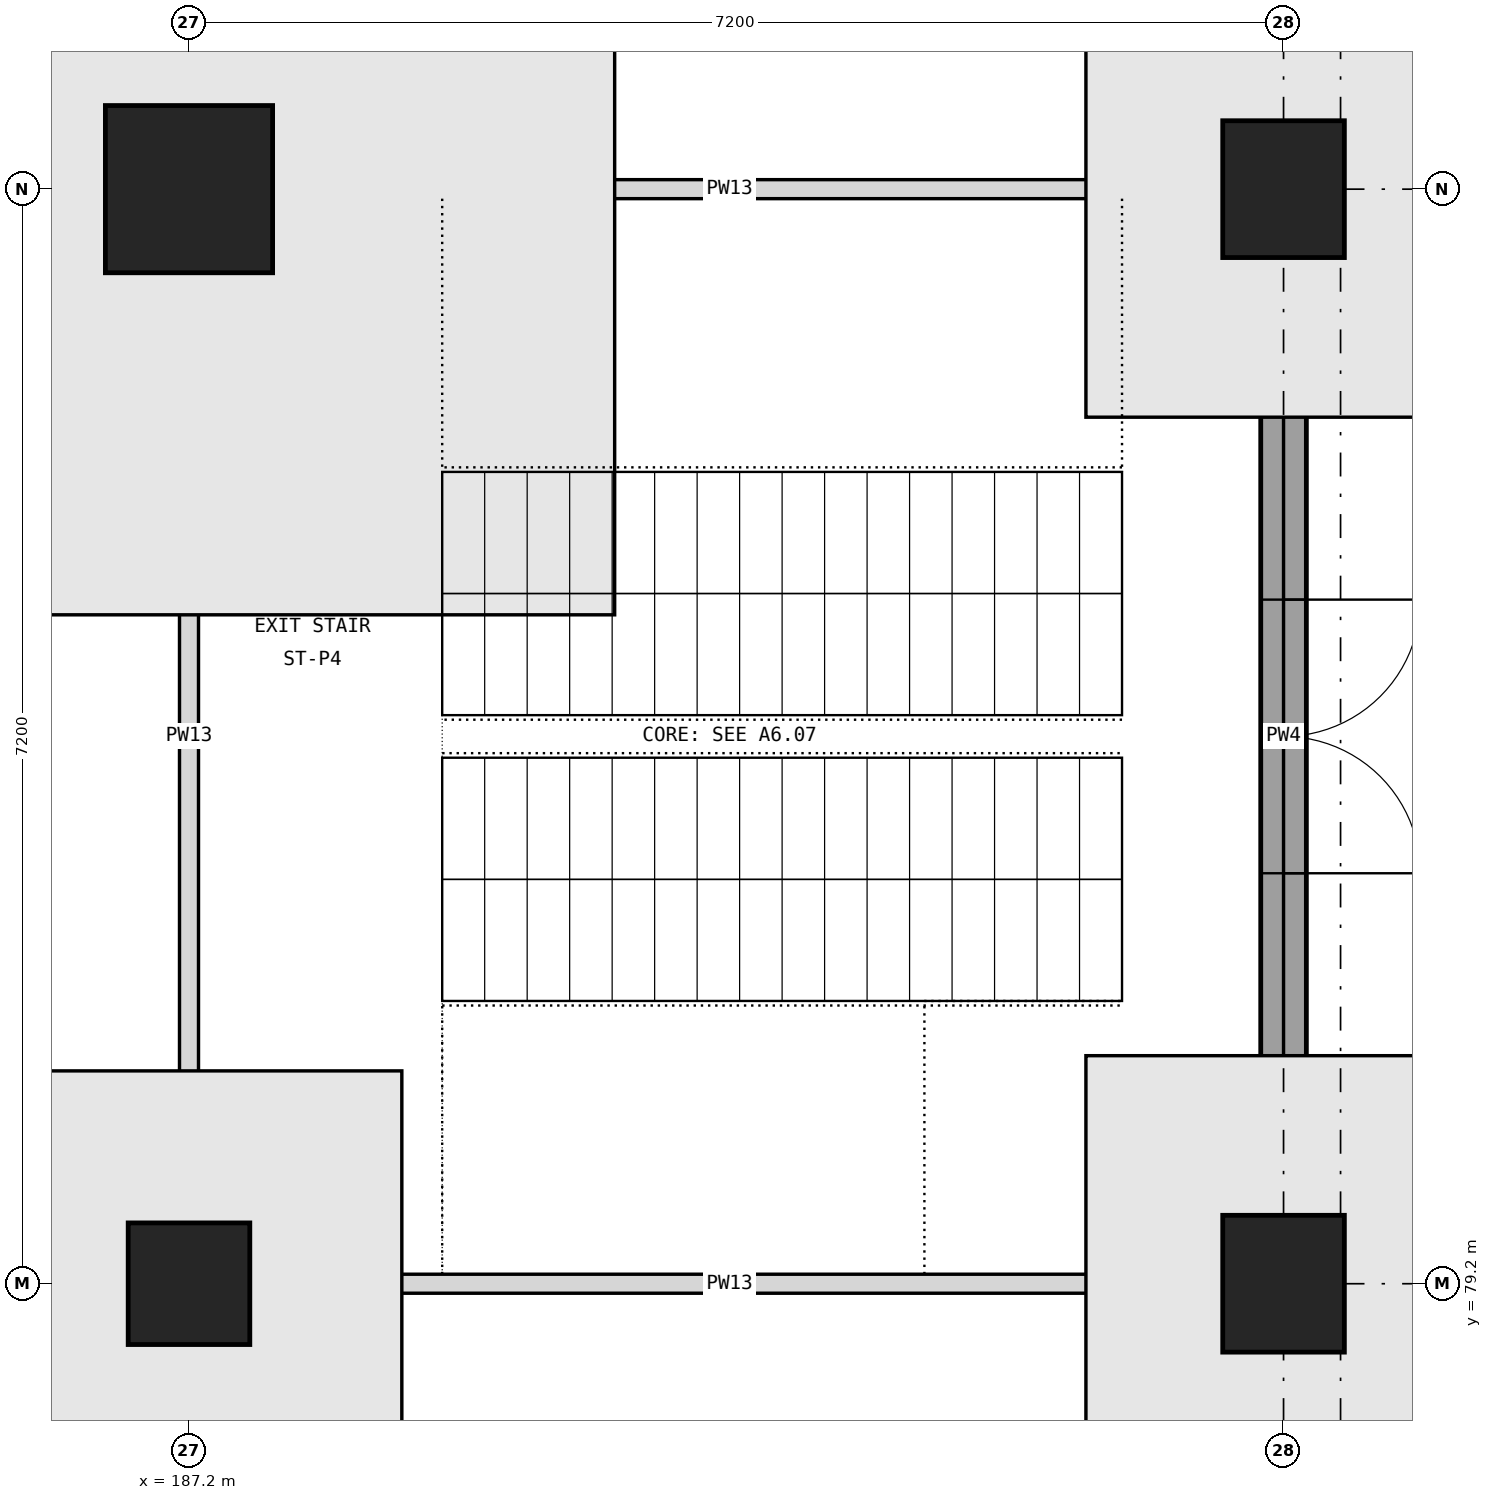
"""IFC4 building model, lengths in metres.
Left out: names, types, materials, properties, quantities, classifications, styles, units other than length and angle.
Written with IfcOpenShell. Run it as: python <this file> out.ifc"""

import sys

from ifc_helpers import new_model, si_unit, direction, frame, frame_2d, origin, origin_2d, place, context, subcontext, project, spatial, rectangle, extrude, element, fill, save


model = new_model("IFC4")
c1 = context("Model", 3, precision=1e-05, world=origin(), true_north=direction((0.0, 1.0)))
c2 = subcontext(c1, "Body", "Model", "MODEL_VIEW")
j1 = project(units=[si_unit("LENGTHUNIT", "METRE"), si_unit("PLANEANGLEUNIT", "RADIAN")], contexts=[c1])
p1 = place(None, origin())
s1 = spatial("IfcSite", under=j1, at=p1, CompositionType="ELEMENT")
p2 = place(p1, origin())
s2 = spatial("IfcBuilding", under=s1, at=p2, CompositionType="ELEMENT")
p3 = place(p2, origin())
s3 = spatial("IfcBuildingStorey", under=s2, at=p3, CompositionType="ELEMENT", Elevation=0.0)
p4 = place(p3, frame((187.2, 79.2, 0.0), z_axis=(0.0, 0.0, 1.0), x_axis=(1.0, 0.0, 0.0)))
e1 = element("IfcColumn", 1, at=p4, inside=s3, PredefinedType="COLUMN", context=c2, shape_type="SweptSolid", body=[
    extrude(rectangle(XDim=0.8, YDim=0.8, at=origin_2d()), origin(), (0.0, 0.0, 1.0), 6.0),
])
p5 = place(p3, frame((187.2, 86.4, 0.0), z_axis=(0.0, 0.0, 1.0), x_axis=(1.0, 0.0, 0.0)))
e2 = element("IfcColumn", 2, at=p5, inside=s3, PredefinedType="COLUMN", context=c2, shape_type="SweptSolid", body=[
    extrude(rectangle(XDim=1.1, YDim=1.1, at=origin_2d()), origin(), (0.0, 0.0, 1.0), 6.0),
])
for number, where, z_axis, x_axis in (
    (3, (194.4, 79.2, 0.0), (0.0, 0.0, 1.0), (1.0, 0.0, 0.0)),
    (4, (194.4, 86.4, 0.0), (0.0, 0.0, 1.0), (1.0, 0.0, 0.0)),
):
    element("IfcColumn", number, at=place(p3, frame(where, z_axis=z_axis, x_axis=x_axis)), inside=s3, PredefinedType="COLUMN", context=c2, shape_type="SweptSolid", body=[
        extrude(rectangle(XDim=0.8, YDim=0.9, at=origin_2d()), origin(), (0.0, 0.0, 1.0), 6.0),
    ])
p6 = place(p3, frame((194.4, 72.45, 0.0), z_axis=(0.0, 0.0, 1.0), x_axis=(0.0, 1.0, 0.0)))
e5 = element("IfcWall", 5, at=p6, inside=s3, PredefinedType="SOLIDWALL", context=c2, shape_type="SweptSolid", body=[
    extrude(rectangle(XDim=6.3, YDim=0.3, at=frame_2d((3.15, 0.0))), origin(), (0.0, 0.0, 1.0), 5.1),
])
p7 = place(p6, frame((2.25, 0.0, 0.0)))
e6 = element("IfcOpeningElement", 6, at=p7, cuts=e5, PredefinedType="OPENING", context=c2, shape_type="SweptSolid", body=[
    extrude(rectangle(XDim=1.8, YDim=2.4, at=frame_2d((0.9, 1.2))), frame((0.0, 0.16, 0.0), z_axis=(0.0, -1.0, 0.0), x_axis=(1.0, 0.0, 0.0)), (0.0, 0.0, 1.0), 0.32),
])
p8 = place(p3, frame((194.4, 79.65, 0.0), z_axis=(0.0, 0.0, 1.0), x_axis=(0.0, 1.0, 0.0)))
e7 = element("IfcWall", 7, at=p8, inside=s3, PredefinedType="SOLIDWALL", context=c2, shape_type="SweptSolid", body=[
    extrude(rectangle(XDim=6.3, YDim=0.3, at=frame_2d((3.15, 0.0))), origin(), (0.0, 0.0, 1.0), 5.1),
])
p9 = place(p8, frame((2.25, 0.0, 0.0)))
e8 = element("IfcOpeningElement", 8, at=p9, cuts=e7, PredefinedType="OPENING", context=c2, shape_type="SweptSolid", body=[
    extrude(rectangle(XDim=1.8, YDim=2.1, at=frame_2d((0.9, 1.05))), frame((0.0, 0.16, 0.0), z_axis=(0.0, -1.0, 0.0), x_axis=(1.0, 0.0, 0.0)), (0.0, 0.0, 1.0), 0.32),
])
p10 = place(p3, frame((194.4, 86.85, 0.0), z_axis=(0.0, 0.0, 1.0), x_axis=(0.0, 1.0, 0.0)))
e9 = element("IfcWall", 9, at=p10, inside=s3, PredefinedType="SOLIDWALL", context=c2, shape_type="SweptSolid", body=[
    extrude(rectangle(XDim=6.2, YDim=0.3, at=frame_2d((3.1, 0.0))), origin(), (0.0, 0.0, 1.0), 5.1),
])
p11 = place(p10, frame((2.25, 0.0, 0.0)))
e10 = element("IfcOpeningElement", 10, at=p11, cuts=e9, PredefinedType="OPENING", context=c2, shape_type="SweptSolid", body=[
    extrude(rectangle(XDim=1.8, YDim=2.4, at=frame_2d((0.9, 1.2))), frame((0.0, 0.16, 0.0), z_axis=(0.0, -1.0, 0.0), x_axis=(1.0, 0.0, 0.0)), (0.0, 0.0, 1.0), 0.32),
])
for number, where, z_axis, x_axis in (
    (11, (187.262, 79.2, 0.0), (0.0, 0.0, 1.0), (1.0, 0.0, 0.0)),
    (12, (187.262, 86.4, 0.0), (0.0, 0.0, 1.0), (1.0, 0.0, 0.0)),
):
    element("IfcWall", number, at=place(p3, frame(where, z_axis=z_axis, x_axis=x_axis)), inside=s3, PredefinedType="SOLIDWALL", context=c2, shape_type="SweptSolid", body=[
        extrude(rectangle(XDim=6.988, YDim=0.125, at=frame_2d((3.494, 0.0))), origin(), (0.0, 0.0, 1.0), 5.5),
    ])
p12 = place(p3, frame((187.2, 79.137, 0.0), z_axis=(0.0, 0.0, 1.0), x_axis=(0.0, 1.0, 0.0)))
e13 = element("IfcWall", 13, at=p12, inside=s3, PredefinedType="SOLIDWALL", context=c2, shape_type="SweptSolid", body=[
    extrude(rectangle(XDim=7.325, YDim=0.125, at=frame_2d((3.663, 0.0))), origin(), (0.0, 0.0, 1.0), 5.5),
])
p13 = place(p9, frame((1.8, 0.0, 0.0), z_axis=(0.0, 0.0, 1.0), x_axis=(-1.0, 0.0, 0.0)))
e14 = element("IfcDoor", 14, at=p13, inside=s3, OperationType="DOUBLE_DOOR_SINGLE_SWING", PredefinedType="DOOR", context=c2, shape_type="SweptSolid", body=[
    extrude(rectangle(XDim=1.8, YDim=2.1, at=frame_2d((0.9, 1.05))), frame((0.0, 0.025, 0.0), z_axis=(0.0, -1.0, 0.0), x_axis=(1.0, 0.0, 0.0)), (0.0, 0.0, 1.0), 0.05),
])
fill(e8, e14)
save(model, sys.argv[1])
